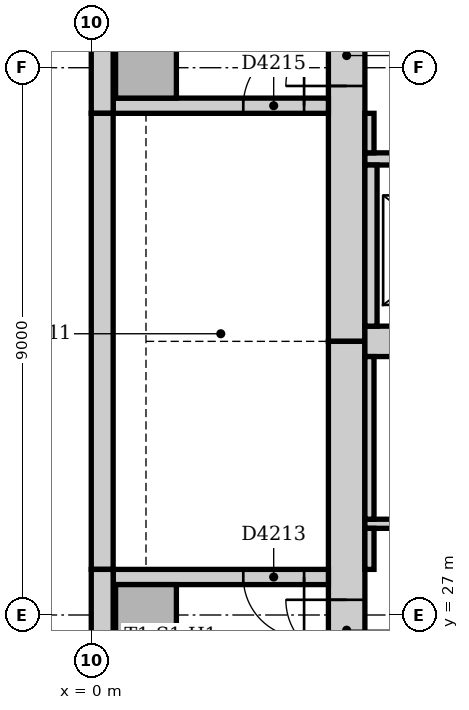
"""IFC4 building model, lengths in metres.
Left out: names, types, materials, properties, quantities, classifications, styles, units other than length and angle.
Written with IfcOpenShell. Run it as: python <this file> out.ifc"""

import sys

from ifc_helpers import new_model, si_unit, direction, frame, frame_2d, origin, origin_2d, place, context, subcontext, project, spatial, rectangle, extrude, element, fill, save


model = new_model("IFC4")
c1 = context("Model", 3, precision=1e-05, world=origin(), true_north=direction((0.0, 1.0)))
c2 = subcontext(c1, "Body", "Model", "MODEL_VIEW")
j1 = project(units=[si_unit("LENGTHUNIT", "METRE"), si_unit("PLANEANGLEUNIT", "RADIAN")], contexts=[c1])
p1 = place(None, origin())
s1 = spatial("IfcSite", under=j1, at=p1, CompositionType="ELEMENT")
p2 = place(p1, origin())
s2 = spatial("IfcBuilding", under=s1, at=p2, CompositionType="ELEMENT")
p3 = place(p2, frame((0.0, 0.0, 128.0)))
s3 = spatial("IfcBuildingStorey", under=s2, at=p3, CompositionType="ELEMENT", Elevation=128.0)
p4 = place(p3, frame((4.2, 42.0, 0.0), z_axis=(0.0, 0.0, 1.0), x_axis=(0.0, -1.0, 0.0)))
e1 = element("IfcWall", 1, at=p4, inside=s3, PredefinedType="SOLIDWALL", context=c2, shape_type="SweptSolid", body=[
    extrude(rectangle(XDim=10.5, YDim=0.6, at=frame_2d((5.25, 0.0))), origin(), (0.0, 0.0, 1.0), 4.0),
])
p5 = place(p4, frame((5.3, 0.0, 0.0)))
e2 = element("IfcOpeningElement", 2, at=p5, cuts=e1, PredefinedType="OPENING", context=c2, shape_type="SweptSolid", body=[
    extrude(rectangle(XDim=1.0, YDim=2.1, at=frame_2d((0.5, 1.05))), frame((0.0, 0.31, 0.0), z_axis=(0.0, -1.0, 0.0), x_axis=(1.0, 0.0, 0.0)), (0.0, 0.0, 1.0), 0.62),
])
p6 = place(p3, frame((4.2, 31.5, 0.0), z_axis=(0.0, 0.0, 1.0), x_axis=(0.0, -1.0, 0.0)))
e3 = element("IfcWall", 3, at=p6, inside=s3, PredefinedType="SOLIDWALL", context=c2, shape_type="SweptSolid", body=[
    extrude(rectangle(XDim=10.5, YDim=0.6, at=frame_2d((5.25, 0.0))), origin(), (0.0, 0.0, 1.0), 4.0),
])
p7 = place(p6, frame((4.25, 0.0, 0.0)))
e4 = element("IfcOpeningElement", 4, at=p7, cuts=e3, PredefinedType="OPENING", context=c2, shape_type="SweptSolid", body=[
    extrude(rectangle(XDim=1.0, YDim=2.1, at=frame_2d((0.5, 1.05))), frame((0.0, 0.31, 0.0), z_axis=(0.0, -1.0, 0.0), x_axis=(1.0, 0.0, 0.0)), (0.0, 0.0, 1.0), 0.62),
])
p8 = place(p3, frame((4.5, 31.5, 0.0), z_axis=(0.0, 0.0, 1.0), x_axis=(1.0, 0.0, 0.0)))
e5 = element("IfcWall", 5, at=p8, inside=s3, PredefinedType="SOLIDWALL", context=c2, shape_type="SweptSolid", body=[
    extrude(rectangle(XDim=18.0, YDim=0.5, at=frame_2d((9.0, 0.0))), origin(), (0.0, 0.0, 1.0), 4.0),
])
p9 = place(p3, frame((3.9, 27.625, 0.0), z_axis=(0.0, 0.0, 1.0), x_axis=(-1.0, 0.0, 0.0)))
e6 = element("IfcWall", 6, at=p9, inside=s3, PredefinedType="SOLIDWALL", context=c2, shape_type="SweptSolid", body=[
    extrude(rectangle(XDim=3.54, YDim=0.25, at=frame_2d((1.77, 0.0))), origin(), (0.0, 0.0, 1.0), 4.0),
])
p10 = place(p9, frame((0.4, 0.0, 0.0)))
e7 = element("IfcOpeningElement", 7, at=p10, cuts=e6, PredefinedType="OPENING", context=c2, shape_type="SweptSolid", body=[
    extrude(rectangle(XDim=1.0, YDim=2.1, at=frame_2d((0.5, 1.05))), frame((0.0, 0.135, 0.0), z_axis=(0.0, -1.0, 0.0), x_axis=(1.0, 0.0, 0.0)), (0.0, 0.0, 1.0), 0.27),
])
p11 = place(p3, frame((0.36, 35.375, 0.0), z_axis=(0.0, 0.0, 1.0), x_axis=(1.0, 0.0, 0.0)))
e8 = element("IfcWall", 8, at=p11, inside=s3, PredefinedType="SOLIDWALL", context=c2, shape_type="SweptSolid", body=[
    extrude(rectangle(XDim=3.54, YDim=0.25, at=frame_2d((1.77, 0.0))), origin(), (0.0, 0.0, 1.0), 4.0),
])
p12 = place(p11, frame((2.14, 0.0, 0.0)))
e9 = element("IfcOpeningElement", 9, at=p12, cuts=e8, PredefinedType="OPENING", context=c2, shape_type="SweptSolid", body=[
    extrude(rectangle(XDim=1.0, YDim=2.1, at=frame_2d((0.5, 1.05))), frame((0.0, 0.135, 0.0), z_axis=(0.0, -1.0, 0.0), x_axis=(1.0, 0.0, 0.0)), (0.0, 0.0, 1.0), 0.27),
])
for number, where, z_axis, x_axis in (
    (10, (0.9, 27.0, 0.0), (0.0, 0.0, 1.0), (1.0, 0.0, 0.0)),
    (11, (0.9, 36.0, 0.0), (0.0, 0.0, 1.0), (1.0, 0.0, 0.0)),
):
    element("IfcColumn", number, at=place(p3, frame(where, z_axis=z_axis, x_axis=x_axis)), inside=s3, PredefinedType="COLUMN", context=c2, shape_type="SweptSolid", body=[
        extrude(rectangle(XDim=1.0, YDim=1.0, at=origin_2d()), origin(), (0.0, 0.0, 1.0), 4.0),
    ])
p13 = place(p3, frame((0.18, 42.0, 0.0), z_axis=(0.0, 0.0, 1.0), x_axis=(0.0, -1.0, 0.0)))
e12 = element("IfcWall", 12, at=p13, inside=s3, PredefinedType="STANDARD", context=c2, shape_type="SweptSolid", body=[
    extrude(rectangle(XDim=6.75, YDim=0.36, at=frame_2d((3.375, 0.0))), origin(), (0.0, 0.0, 1.0), 3.85),
])
p14 = place(p3, frame((0.18, 35.25, 0.0), z_axis=(0.0, 0.0, 1.0), x_axis=(0.0, -1.0, 0.0)))
e13 = element("IfcWall", 13, at=p14, inside=s3, PredefinedType="STANDARD", context=c2, shape_type="SweptSolid", body=[
    extrude(rectangle(XDim=7.5, YDim=0.36, at=frame_2d((3.75, 0.0))), origin(), (0.0, 0.0, 1.0), 3.85),
])
p15 = place(p3, frame((0.18, 27.75, 0.0), z_axis=(0.0, 0.0, 1.0), x_axis=(0.0, -1.0, 0.0)))
e14 = element("IfcWall", 14, at=p15, inside=s3, PredefinedType="STANDARD", context=c2, shape_type="SweptSolid", body=[
    extrude(rectangle(XDim=6.75, YDim=0.36, at=frame_2d((3.375, 0.0))), origin(), (0.0, 0.0, 1.0), 3.85),
])
p16 = place(p3, frame((4.5, 34.5, 0.0), z_axis=(0.0, 0.0, 1.0), x_axis=(1.0, 0.0, 0.0)))
e15 = element("IfcWall", 15, at=p16, inside=s3, PredefinedType="PARTITIONING", context=c2, shape_type="SweptSolid", body=[
    extrude(rectangle(XDim=18.0, YDim=0.2, at=frame_2d((9.0, 0.0))), origin(), (0.0, 0.0, 1.0), 3.85),
])
p17 = place(p16, frame((0.95, 0.0, 0.0)))
e16 = element("IfcOpeningElement", 16, at=p17, cuts=e15, PredefinedType="OPENING", context=c2, shape_type="SweptSolid", body=[
    extrude(rectangle(XDim=1.1, YDim=2.1, at=frame_2d((0.55, 1.05))), frame((0.0, 0.11, 0.0), z_axis=(0.0, -1.0, 0.0), x_axis=(1.0, 0.0, 0.0)), (0.0, 0.0, 1.0), 0.22),
])
p18 = place(p16, frame((3.95, 0.0, 0.0)))
e17 = element("IfcOpeningElement", 17, at=p18, cuts=e15, PredefinedType="OPENING", context=c2, shape_type="SweptSolid", body=[
    extrude(rectangle(XDim=1.1, YDim=2.1, at=frame_2d((0.55, 1.05))), frame((0.0, 0.11, 0.0), z_axis=(0.0, -1.0, 0.0), x_axis=(1.0, 0.0, 0.0)), (0.0, 0.0, 1.0), 0.22),
])
p19 = place(p16, frame((12.95, 0.0, 0.0)))
e18 = element("IfcOpeningElement", 18, at=p19, cuts=e15, PredefinedType="OPENING", context=c2, shape_type="SweptSolid", body=[
    extrude(rectangle(XDim=1.1, YDim=2.1, at=frame_2d((0.55, 1.05))), frame((0.0, 0.11, 0.0), z_axis=(0.0, -1.0, 0.0), x_axis=(1.0, 0.0, 0.0)), (0.0, 0.0, 1.0), 0.22),
])
p20 = place(p16, frame((15.95, 0.0, 0.0)))
e19 = element("IfcOpeningElement", 19, at=p20, cuts=e15, PredefinedType="OPENING", context=c2, shape_type="SweptSolid", body=[
    extrude(rectangle(XDim=1.1, YDim=2.1, at=frame_2d((0.55, 1.05))), frame((0.0, 0.11, 0.0), z_axis=(0.0, -1.0, 0.0), x_axis=(1.0, 0.0, 0.0)), (0.0, 0.0, 1.0), 0.22),
])
p21 = place(p3, frame((4.6, 31.75, 0.0), z_axis=(0.0, 0.0, 1.0), x_axis=(0.0, 1.0, 0.0)))
e20 = element("IfcWall", 20, at=p21, inside=s3, PredefinedType="PARTITIONING", context=c2, shape_type="SweptSolid", body=[
    extrude(rectangle(XDim=2.65, YDim=0.2, at=frame_2d((1.325, 0.0))), origin(), (0.0, 0.0, 1.0), 3.85),
])
p22 = place(p3, frame((4.5, 28.5, 0.0), z_axis=(0.0, 0.0, 1.0), x_axis=(1.0, 0.0, 0.0)))
e21 = element("IfcWall", 21, at=p22, inside=s3, PredefinedType="PARTITIONING", context=c2, shape_type="SweptSolid", body=[
    extrude(rectangle(XDim=18.0, YDim=0.15, at=frame_2d((9.0, 0.0))), origin(), (0.0, 0.0, 1.0), 3.85),
])
p23 = place(p22, frame((1.1, 0.0, 0.0)))
e22 = element("IfcOpeningElement", 22, at=p23, cuts=e21, PredefinedType="OPENING", context=c2, shape_type="SweptSolid", body=[
    extrude(rectangle(XDim=0.9, YDim=2.1, at=frame_2d((0.45, 1.05))), frame((0.0, 0.085, 0.0), z_axis=(0.0, -1.0, 0.0), x_axis=(1.0, 0.0, 0.0)), (0.0, 0.0, 1.0), 0.17),
])
p24 = place(p22, frame((7.05, 0.0, 0.0)))
e23 = element("IfcOpeningElement", 23, at=p24, cuts=e21, PredefinedType="OPENING", context=c2, shape_type="SweptSolid", body=[
    extrude(rectangle(XDim=0.9, YDim=2.1, at=frame_2d((0.45, 1.05))), frame((0.0, 0.085, 0.0), z_axis=(0.0, -1.0, 0.0), x_axis=(1.0, 0.0, 0.0)), (0.0, 0.0, 1.0), 0.17),
])
p25 = place(p22, frame((14.45, 0.0, 0.0)))
e24 = element("IfcOpeningElement", 24, at=p25, cuts=e21, PredefinedType="OPENING", context=c2, shape_type="SweptSolid", body=[
    extrude(rectangle(XDim=0.9, YDim=2.1, at=frame_2d((0.45, 1.05))), frame((0.0, 0.085, 0.0), z_axis=(0.0, -1.0, 0.0), x_axis=(1.0, 0.0, 0.0)), (0.0, 0.0, 1.0), 0.17),
])
p26 = place(p3, frame((4.575, 27.75, 0.0), z_axis=(0.0, 0.0, 1.0), x_axis=(0.0, 1.0, 0.0)))
e25 = element("IfcWall", 25, at=p26, inside=s3, PredefinedType="PARTITIONING", context=c2, shape_type="SweptSolid", body=[
    extrude(rectangle(XDim=0.675, YDim=0.15, at=frame_2d((0.338, 0.0))), origin(), (0.0, 0.0, 1.0), 3.85),
])
p27 = place(p3, frame((4.575, 28.575, 0.0), z_axis=(0.0, 0.0, 1.0), x_axis=(0.0, 1.0, 0.0)))
e26 = element("IfcWall", 26, at=p27, inside=s3, PredefinedType="PARTITIONING", context=c2, shape_type="SweptSolid", body=[
    extrude(rectangle(XDim=2.675, YDim=0.15, at=frame_2d((1.337, 0.0))), origin(), (0.0, 0.0, 1.0), 3.85),
])
p28 = place(p3, frame((4.575, 34.6, 0.0), z_axis=(0.0, 0.0, 1.0), x_axis=(0.0, 1.0, 0.0)))
e27 = element("IfcWall", 27, at=p28, inside=s3, PredefinedType="PARTITIONING", context=c2, shape_type="SweptSolid", body=[
    extrude(rectangle(XDim=0.65, YDim=0.15, at=frame_2d((0.325, 0.0))), origin(), (0.0, 0.0, 1.0), 3.85),
])
p29 = place(p7, frame((1.0, 0.0, 0.0), z_axis=(0.0, 0.0, 1.0), x_axis=(-1.0, 0.0, 0.0)))
e28 = element("IfcDoor", 28, at=p29, inside=s3, OperationType="SINGLE_SWING_RIGHT", PredefinedType="DOOR", context=c2, shape_type="SweptSolid", body=[
    extrude(rectangle(XDim=1.0, YDim=2.1, at=frame_2d((0.5, 1.05))), frame((0.0, 0.025, 0.0), z_axis=(0.0, -1.0, 0.0), x_axis=(1.0, 0.0, 0.0)), (0.0, 0.0, 1.0), 0.05),
])
fill(e4, e28)
p30 = place(p10, origin())
e29 = element("IfcDoor", 29, at=p30, inside=s3, OperationType="SINGLE_SWING_LEFT", PredefinedType="DOOR", context=c2, shape_type="SweptSolid", body=[
    extrude(rectangle(XDim=1.0, YDim=2.1, at=frame_2d((0.5, 1.05))), frame((0.0, 0.025, 0.0), z_axis=(0.0, -1.0, 0.0), x_axis=(1.0, 0.0, 0.0)), (0.0, 0.0, 1.0), 0.05),
])
fill(e7, e29)
p31 = place(p5, frame((1.0, 0.0, 0.0), z_axis=(0.0, 0.0, 1.0), x_axis=(-1.0, 0.0, 0.0)))
e30 = element("IfcDoor", 30, at=p31, inside=s3, OperationType="SINGLE_SWING_LEFT", PredefinedType="DOOR", context=c2, shape_type="SweptSolid", body=[
    extrude(rectangle(XDim=1.0, YDim=2.1, at=frame_2d((0.5, 1.05))), frame((0.0, 0.025, 0.0), z_axis=(0.0, -1.0, 0.0), x_axis=(1.0, 0.0, 0.0)), (0.0, 0.0, 1.0), 0.05),
])
fill(e2, e30)
p32 = place(p12, origin())
e31 = element("IfcDoor", 31, at=p32, inside=s3, OperationType="SINGLE_SWING_RIGHT", PredefinedType="DOOR", context=c2, shape_type="SweptSolid", body=[
    extrude(rectangle(XDim=1.0, YDim=2.1, at=frame_2d((0.5, 1.05))), frame((0.0, 0.025, 0.0), z_axis=(0.0, -1.0, 0.0), x_axis=(1.0, 0.0, 0.0)), (0.0, 0.0, 1.0), 0.05),
])
fill(e9, e31)
save(model, sys.argv[1])
